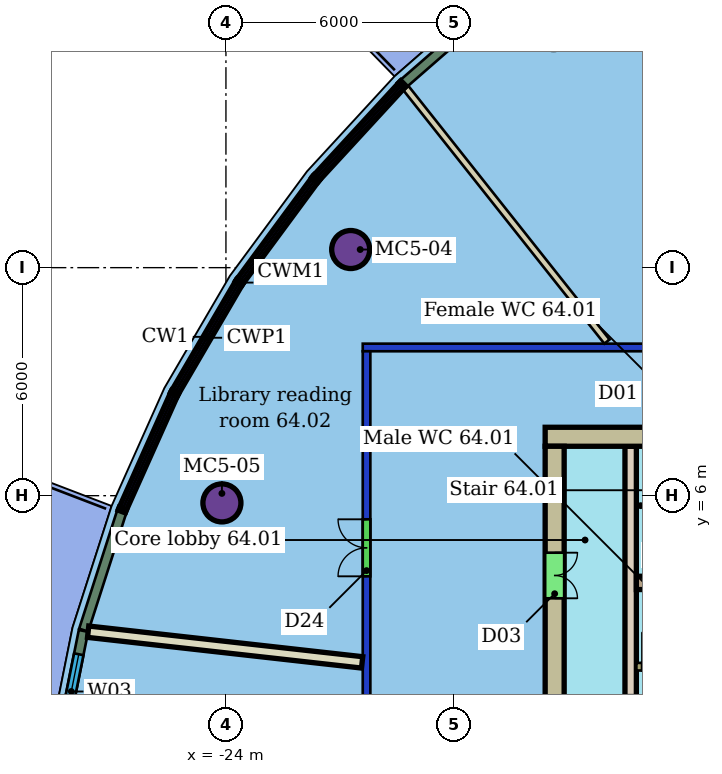
"""IFC4 building model, lengths in metres.
Left out: names, types, materials, properties, quantities, classifications, styles, units other than length and angle.
Written with IfcOpenShell. Run it as: python <this file> out.ifc"""

import sys

from ifc_helpers import new_model, si_unit, direction, frame, frame_2d, origin, origin_2d, place, context, subcontext, project, spatial, rectangle, hollow_circle, extrude, element, fill, save


model = new_model("IFC4")
c1 = context("Model", 3, precision=1e-05, world=origin(), true_north=direction((0.0, 1.0)))
c2 = subcontext(c1, "Body", "Model", "MODEL_VIEW")
j1 = project(units=[si_unit("LENGTHUNIT", "METRE"), si_unit("PLANEANGLEUNIT", "RADIAN")], contexts=[c1])
p1 = place(None, origin())
s1 = spatial("IfcSite", under=j1, at=p1, CompositionType="ELEMENT")
p2 = place(p1, origin())
s2 = spatial("IfcBuilding", under=s1, at=p2, CompositionType="ELEMENT")
p3 = place(p2, frame((0.0, 0.0, 261.3)))
s3 = spatial("IfcBuildingStorey", under=s2, at=p3, CompositionType="ELEMENT", Elevation=261.3)
for number, where, z_axis, x_axis in (
    (1, (-20.718, 12.477, 0.0), (0.0, 0.0, 1.0), (1.0, 0.0, 0.0)),
    (2, (-24.106, 5.81, 0.0), (0.0, 0.0, 1.0), (1.0, 0.0, 0.0)),
):
    element("IfcColumn", number, at=place(p3, frame(where, z_axis=z_axis, x_axis=x_axis)), inside=s3, PredefinedType="COLUMN", context=c2, shape_type="SweptSolid", body=[
        extrude(hollow_circle(Radius=0.5, WallThickness=0.04, at=origin_2d()), origin(), (0.0, 0.0, 1.0), 3.45),
    ])
p4 = place(p3, frame((-20.3, -9.8, 0.0), z_axis=(0.0, 0.0, 1.0), x_axis=(0.0, 1.0, 0.0)))
e3 = element("IfcWall", 3, at=p4, inside=s3, PredefinedType="PARTITIONING", context=c2, shape_type="SweptSolid", body=[
    extrude(rectangle(XDim=19.6, YDim=0.2, at=frame_2d((9.8, 0.0))), origin(), (0.0, 0.0, 1.0), 3.1),
])
p5 = place(p4, frame((13.678, 0.0, 0.0)))
e4 = element("IfcOpeningElement", 4, at=p5, cuts=e3, PredefinedType="OPENING", context=c2, shape_type="SweptSolid", body=[
    extrude(rectangle(XDim=1.5, YDim=2.1, at=frame_2d((0.75, 1.05))), frame((0.0, 0.11, 0.0), z_axis=(0.0, -1.0, 0.0), x_axis=(1.0, 0.0, 0.0)), (0.0, 0.0, 1.0), 0.22),
])
p6 = place(p4, frame((6.822, 0.0, 0.0)))
e5 = element("IfcOpeningElement", 5, at=p6, cuts=e3, PredefinedType="OPENING", context=c2, shape_type="SweptSolid", body=[
    extrude(rectangle(XDim=1.8, YDim=2.4, at=frame_2d((0.9, 1.2))), frame((0.0, 0.11, 0.0), z_axis=(0.0, -1.0, 0.0), x_axis=(1.0, 0.0, 0.0)), (0.0, 0.0, 1.0), 0.22),
])
p7 = place(p3, frame((-20.4, 9.9, 0.0), z_axis=(0.0, 0.0, 1.0), x_axis=(1.0, 0.0, 0.0)))
e6 = element("IfcWall", 6, at=p7, inside=s3, PredefinedType="PARTITIONING", context=c2, shape_type="SweptSolid", body=[
    extrude(rectangle(XDim=28.8, YDim=0.2, at=frame_2d((14.4, 0.0))), origin(), (0.0, 0.0, 1.0), 3.1),
])
p8 = place(p7, frame((9.729, 0.0, 0.0)))
e7 = element("IfcOpeningElement", 7, at=p8, cuts=e6, PredefinedType="OPENING", context=c2, shape_type="SweptSolid", body=[
    extrude(rectangle(XDim=1.5, YDim=2.1, at=frame_2d((0.75, 1.05))), frame((0.0, 0.11, 0.0), z_axis=(0.0, -1.0, 0.0), x_axis=(1.0, 0.0, 0.0)), (0.0, 0.0, 1.0), 0.22),
])
p9 = place(p7, frame((20.808, 0.0, 0.0)))
e8 = element("IfcOpeningElement", 8, at=p9, cuts=e6, PredefinedType="OPENING", context=c2, shape_type="SweptSolid", body=[
    extrude(rectangle(XDim=1.0, YDim=2.1, at=frame_2d((0.5, 1.05))), frame((0.0, 0.11, 0.0), z_axis=(0.0, -1.0, 0.0), x_axis=(1.0, 0.0, 0.0)), (0.0, 0.0, 1.0), 0.22),
])
p10 = place(p3, frame((-19.269, 16.73, 0.0), z_axis=(0.0, 0.0, 1.0), x_axis=(0.621411694678, -0.783484208978, 0.0)))
e9 = element("IfcWall", 9, at=p10, inside=s3, PredefinedType="PARTITIONING", context=c2, shape_type="SweptSolid", body=[
    extrude(rectangle(XDim=8.52, YDim=0.175, at=frame_2d((4.26, 0.0))), origin(), (0.0, 0.0, 1.0), 3.45),
])
p11 = place(p3, frame((-27.626, 2.421, 0.0), z_axis=(0.0, 0.0, 1.0), x_axis=(0.993791041834, -0.11126259556, 0.0)))
e10 = element("IfcWall", 10, at=p11, inside=s3, PredefinedType="PARTITIONING", context=c2, shape_type="SweptSolid", body=[
    extrude(rectangle(XDim=7.254, YDim=0.3, at=frame_2d((3.627, 0.0))), origin(), (0.0, 0.0, 1.0), 3.45),
])
p12 = place(p3, frame((-16.856, 19.0, 0.0), z_axis=(0.0, 0.0, 1.0), x_axis=(-0.753618743279, -0.657311790385, 0.0)))
e11 = element("IfcWall", 11, at=p12, inside=s3, PredefinedType="SOLIDWALL", context=c2, shape_type="SweptSolid", body=[
    extrude(rectangle(XDim=3.263, YDim=0.25, at=frame_2d((1.631, 0.0))), origin(), (0.0, 0.0, 1.0), 3.15),
])
p13 = place(p3, frame((-26.745, 5.569, 0.0), z_axis=(0.0, 0.0, 1.0), x_axis=(-0.305926817151, -0.95205503126, 0.0)))
e12 = element("IfcWall", 12, at=p13, inside=s3, PredefinedType="SOLIDWALL", context=c2, shape_type="SweptSolid", body=[
    extrude(rectangle(XDim=3.262, YDim=0.25, at=frame_2d((1.631, 0.0))), origin(), (0.0, 0.0, 1.0), 3.15),
])
p14 = place(p3, frame((-27.749, 2.442, 0.0), z_axis=(0.0, 0.0, 1.0), x_axis=(-0.196910086412, -0.980421551104, 0.0)))
e13 = element("IfcWall", 13, at=p14, inside=s3, PredefinedType="SOLIDWALL", context=c2, shape_type="SweptSolid", body=[
    extrude(rectangle(XDim=3.252, YDim=0.25, at=frame_2d((1.626, 0.0))), origin(), (0.0, 0.0, 1.0), 3.15),
])
p15 = place(p14, frame((0.626, 0.0, 0.9)))
e14 = element("IfcOpeningElement", 14, at=p15, cuts=e13, PredefinedType="OPENING", context=c2, shape_type="SweptSolid", body=[
    extrude(rectangle(XDim=2.0, YDim=2.1, at=frame_2d((1.0, 1.05))), frame((0.0, 0.135, 0.0), z_axis=(0.0, -1.0, 0.0), x_axis=(1.0, 0.0, 0.0)), (0.0, 0.0, 1.0), 0.27),
])
p16 = place(p3, frame((-6.0, 7.55, 0.0), z_axis=(0.0, 0.0, 1.0), x_axis=(-1.0, 0.0, 0.0)))
e15 = element("IfcWall", 15, at=p16, inside=s3, PredefinedType="SHEAR", context=c2, shape_type="SweptSolid", body=[
    extrude(rectangle(XDim=9.6, YDim=0.5, at=frame_2d((4.8, 0.0))), origin(), (0.0, 0.0, 1.0), 3.3),
])
p17 = place(p16, frame((5.2, 0.0, 0.0)))
e16 = element("IfcOpeningElement", 16, at=p17, cuts=e15, PredefinedType="OPENING", context=c2, shape_type="SweptSolid", body=[
    extrude(rectangle(XDim=1.2, YDim=2.1, at=frame_2d((0.6, 1.05))), frame((0.0, 0.26, 0.0), z_axis=(0.0, -1.0, 0.0), x_axis=(1.0, 0.0, 0.0)), (0.0, 0.0, 1.0), 0.52),
])
p18 = place(p3, frame((-15.35, 7.3, 0.0), z_axis=(0.0, 0.0, 1.0), x_axis=(0.0, -1.0, 0.0)))
e17 = element("IfcWall", 17, at=p18, inside=s3, PredefinedType="SHEAR", context=c2, shape_type="SweptSolid", body=[
    extrude(rectangle(XDim=14.6, YDim=0.5, at=frame_2d((7.3, 0.0))), origin(), (0.0, 0.0, 1.0), 3.3),
])
p19 = place(p18, frame((10.6, 0.0, 0.0)))
e18 = element("IfcOpeningElement", 18, at=p19, cuts=e17, PredefinedType="OPENING", context=c2, shape_type="SweptSolid", body=[
    extrude(rectangle(XDim=1.2, YDim=2.1, at=frame_2d((0.6, 1.05))), frame((0.0, 0.26, 0.0), z_axis=(0.0, -1.0, 0.0), x_axis=(1.0, 0.0, 0.0)), (0.0, 0.0, 1.0), 0.52),
])
p20 = place(p18, frame((2.8, 0.0, 0.0)))
e19 = element("IfcOpeningElement", 19, at=p20, cuts=e17, PredefinedType="OPENING", context=c2, shape_type="SweptSolid", body=[
    extrude(rectangle(XDim=1.2, YDim=2.1, at=frame_2d((0.6, 1.05))), frame((0.0, 0.26, 0.0), z_axis=(0.0, -1.0, 0.0), x_axis=(1.0, 0.0, 0.0)), (0.0, 0.0, 1.0), 0.52),
])
p21 = place(p3, frame((-13.2, 3.705, 0.0), z_axis=(0.0, 0.0, 1.0), x_axis=(1.0, 0.0, 0.0)))
e20 = element("IfcWall", 20, at=p21, inside=s3, PredefinedType="SHEAR", context=c2, shape_type="SweptSolid", body=[
    extrude(rectangle(XDim=7.2, YDim=0.35, at=frame_2d((3.6, 0.0))), origin(), (0.0, 0.0, 1.0), 3.3),
])
p22 = place(p3, frame((-13.35, 7.3, 0.0), z_axis=(0.0, 0.0, 1.0), x_axis=(0.0, -1.0, 0.0)))
e21 = element("IfcWall", 21, at=p22, inside=s3, PredefinedType="SHEAR", context=c2, shape_type="SweptSolid", body=[
    extrude(rectangle(XDim=14.6, YDim=0.3, at=frame_2d((7.3, 0.0))), origin(), (0.0, 0.0, 1.0), 3.3),
])
p23 = place(p22, frame((6.55, 0.0, 0.0)))
e22 = element("IfcOpeningElement", 22, at=p23, cuts=e21, PredefinedType="OPENING", context=c2, shape_type="SweptSolid", body=[
    extrude(rectangle(XDim=1.5, YDim=2.1, at=frame_2d((0.75, 1.05))), frame((0.0, 0.16, 0.0), z_axis=(0.0, -1.0, 0.0), x_axis=(1.0, 0.0, 0.0)), (0.0, 0.0, 1.0), 0.32),
])
p24 = place(p3, frame((-13.2, 1.5, 0.0), z_axis=(0.0, 0.0, 1.0), x_axis=(1.0, 0.0, 0.0)))
e23 = element("IfcWall", 23, at=p24, inside=s3, PredefinedType="SHEAR", context=c2, shape_type="SweptSolid", body=[
    extrude(rectangle(XDim=14.4, YDim=0.2, at=frame_2d((7.2, 0.0))), origin(), (0.0, 0.0, 1.0), 3.3),
])
p25 = place(p24, frame((10.312, 0.0, 0.0)))
e24 = element("IfcOpeningElement", 24, at=p25, cuts=e23, PredefinedType="OPENING", context=c2, shape_type="SweptSolid", body=[
    extrude(rectangle(XDim=1.1, YDim=2.1, at=frame_2d((0.55, 1.05))), frame((0.0, 0.11, 0.0), z_axis=(0.0, -1.0, 0.0), x_axis=(1.0, 0.0, 0.0)), (0.0, 0.0, 1.0), 0.22),
])
p26 = place(p24, frame((12.754, 0.0, 0.0)))
e25 = element("IfcOpeningElement", 25, at=p26, cuts=e23, PredefinedType="OPENING", context=c2, shape_type="SweptSolid", body=[
    extrude(rectangle(XDim=1.1, YDim=2.1, at=frame_2d((0.55, 1.05))), frame((0.0, 0.11, 0.0), z_axis=(0.0, -1.0, 0.0), x_axis=(1.0, 0.0, 0.0)), (0.0, 0.0, 1.0), 0.22),
])
p27 = place(p24, frame((0.15, 0.0, 0.0)))
e26 = element("IfcOpeningElement", 26, at=p27, cuts=e23, PredefinedType="OPENING", context=c2, shape_type="SweptSolid", body=[
    extrude(rectangle(XDim=0.9, YDim=2.1, at=frame_2d((0.45, 1.05))), frame((0.0, 0.11, 0.0), z_axis=(0.0, -1.0, 0.0), x_axis=(1.0, 0.0, 0.0)), (0.0, 0.0, 1.0), 0.22),
])
p28 = place(p24, frame((3.365, 0.0, 0.0)))
e27 = element("IfcOpeningElement", 27, at=p28, cuts=e23, PredefinedType="OPENING", context=c2, shape_type="SweptSolid", body=[
    extrude(rectangle(XDim=1.0, YDim=2.1, at=frame_2d((0.5, 1.05))), frame((0.0, 0.11, 0.0), z_axis=(0.0, -1.0, 0.0), x_axis=(1.0, 0.0, 0.0)), (0.0, 0.0, 1.0), 0.22),
])
p29 = place(p24, frame((8.467, 0.0, 0.0)))
e28 = element("IfcOpeningElement", 28, at=p29, cuts=e23, PredefinedType="OPENING", context=c2, shape_type="SweptSolid", body=[
    extrude(rectangle(XDim=0.9, YDim=2.1, at=frame_2d((0.45, 1.05))), frame((0.0, 0.11, 0.0), z_axis=(0.0, -1.0, 0.0), x_axis=(1.0, 0.0, 0.0)), (0.0, 0.0, 1.0), 0.22),
])
p30 = place(p5, origin())
e29 = element("IfcDoor", 29, at=p30, inside=s3, OperationType="DOUBLE_DOOR_SINGLE_SWING", PredefinedType="DOOR", context=c2, shape_type="SweptSolid", body=[
    extrude(rectangle(XDim=1.5, YDim=2.1, at=frame_2d((0.75, 1.05))), frame((0.0, 0.025, 0.0), z_axis=(0.0, -1.0, 0.0), x_axis=(1.0, 0.0, 0.0)), (0.0, 0.0, 1.0), 0.05),
])
fill(e4, e29)
p31 = place(p15, origin())
e30 = element("IfcWindow", 30, at=p31, inside=s3, PartitioningType="SINGLE_PANEL", PredefinedType="WINDOW", context=c2, shape_type="SweptSolid", body=[
    extrude(rectangle(XDim=2.0, YDim=2.1, at=frame_2d((1.0, 1.05))), frame((0.0, 0.03, 0.0), z_axis=(0.0, -1.0, 0.0), x_axis=(1.0, 0.0, 0.0)), (0.0, 0.0, 1.0), 0.06),
])
fill(e14, e30)
p32 = place(p20, origin())
e31 = element("IfcDoor", 31, at=p32, inside=s3, OperationType="DOUBLE_DOOR_SINGLE_SWING", PredefinedType="NOTDEFINED", context=c2, shape_type="SweptSolid", body=[
    extrude(rectangle(XDim=1.2, YDim=2.1, at=frame_2d((0.6, 1.05))), frame((0.0, 0.025, 0.0), z_axis=(0.0, -1.0, 0.0), x_axis=(1.0, 0.0, 0.0)), (0.0, 0.0, 1.0), 0.05),
])
fill(e19, e31)
p33 = place(p27, origin())
e32 = element("IfcDoor", 32, at=p33, inside=s3, OperationType="SINGLE_SWING_LEFT", PredefinedType="NOTDEFINED", context=c2, shape_type="SweptSolid", body=[
    extrude(rectangle(XDim=0.9, YDim=2.1, at=frame_2d((0.45, 1.05))), frame((0.0, 0.025, 0.0), z_axis=(0.0, -1.0, 0.0), x_axis=(1.0, 0.0, 0.0)), (0.0, 0.0, 1.0), 0.05),
])
fill(e26, e32)
save(model, sys.argv[1])
